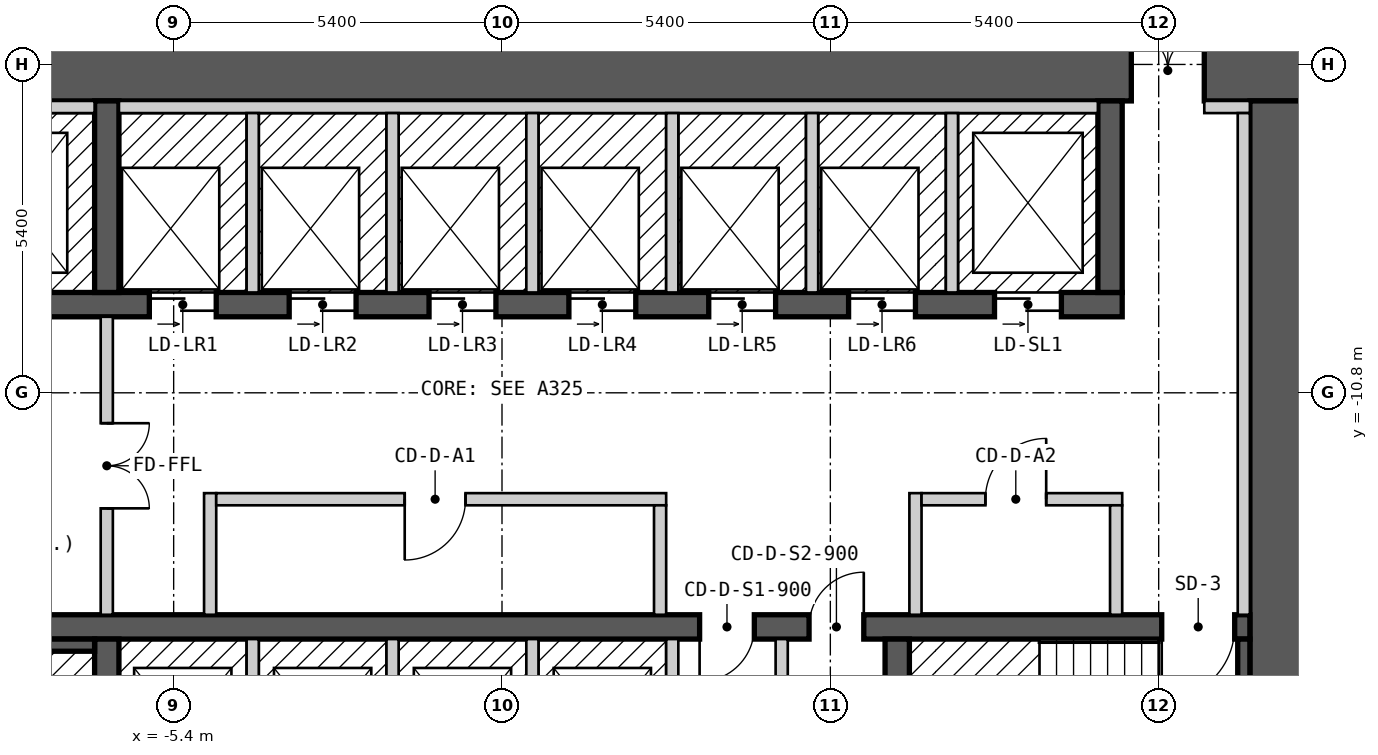
"""IFC4 building model, lengths in metres.
Left out: names, types, materials, properties, quantities, classifications, styles, units other than length and angle.
Written with IfcOpenShell. Run it as: python <this file> out.ifc"""

import sys

from ifc_helpers import new_model, si_unit, direction, frame, frame_2d, origin, place, context, subcontext, project, spatial, rectangle, extrude, element, fill, save


model = new_model("IFC4")
c1 = context("Model", 3, precision=1e-05, world=origin(), true_north=direction((0.0, 1.0)))
c2 = subcontext(c1, "Body", "Model", "MODEL_VIEW")
j1 = project(units=[si_unit("LENGTHUNIT", "METRE"), si_unit("PLANEANGLEUNIT", "RADIAN")], contexts=[c1])
p1 = place(None, origin())
s1 = spatial("IfcSite", under=j1, at=p1, CompositionType="ELEMENT")
p2 = place(p1, origin())
s2 = spatial("IfcBuilding", under=s1, at=p2, CompositionType="ELEMENT")
p3 = place(p2, frame((0.0, 0.0, 84.0)))
s3 = spatial("IfcBuildingStorey", under=s2, at=p3, CompositionType="ELEMENT", Elevation=84.0)
p4 = place(p3, frame((-13.3, -5.5, 0.0), z_axis=(0.0, 0.0, 1.0), x_axis=(1.0, 0.0, 0.0)))
e1 = element("IfcWall", 1, at=p4, inside=s3, PredefinedType="SHEAR", context=c2, shape_type="SweptSolid", body=[
    extrude(rectangle(XDim=26.6, YDim=1.0, at=frame_2d((13.3, 0.0))), origin(), (0.0, 0.0, 1.0), 2.7),
])
p5 = place(p4, frame((23.65, 0.0, 0.0)))
e2 = element("IfcOpeningElement", 2, at=p5, cuts=e1, PredefinedType="OPENING", context=c2, shape_type="SweptSolid", body=[
    extrude(rectangle(XDim=1.2, YDim=2.1, at=frame_2d((0.6, 1.05))), frame((0.0, 0.51, 0.0), z_axis=(0.0, -1.0, 0.0), x_axis=(1.0, 0.0, 0.0)), (0.0, 0.0, 1.0), 1.02),
])
p6 = place(p3, frame((12.8, -18.0, 0.0), z_axis=(0.0, 0.0, 1.0), x_axis=(0.0, 1.0, 0.0)))
e3 = element("IfcWall", 3, at=p6, inside=s3, PredefinedType="SHEAR", context=c2, shape_type="SweptSolid", body=[
    extrude(rectangle(XDim=12.0, YDim=1.0, at=frame_2d((6.0, 0.0))), origin(), (0.0, 0.0, 1.0), 2.7),
])
p7 = place(p3, frame((-12.3, -14.65, 0.0), z_axis=(0.0, 0.0, 1.0), x_axis=(1.0, 0.0, 0.0)))
e4 = element("IfcWall", 4, at=p7, inside=s3, PredefinedType="SHEAR", context=c2, shape_type="SweptSolid", body=[
    extrude(rectangle(XDim=24.6, YDim=0.4, at=frame_2d((12.3, 0.0))), origin(), (0.0, 0.0, 1.0), 2.7),
])
p8 = place(p7, frame((1.5, 0.0, 0.0), z_axis=(0.0, 0.0, 1.0), x_axis=(-1.0, 0.0, 0.0)))
e5 = element("IfcOpeningElement", 5, at=p8, cuts=e4, PredefinedType="OPENING", context=c2, shape_type="SweptSolid", body=[
    extrude(rectangle(XDim=1.2, YDim=2.1, at=frame_2d((0.6, 1.05))), frame((0.0, 0.21, 0.0), z_axis=(0.0, -1.0, 0.0), x_axis=(1.0, 0.0, 0.0)), (0.0, 0.0, 1.0), 0.42),
])
p9 = place(p7, frame((24.35, 0.0, 0.0), z_axis=(0.0, 0.0, 1.0), x_axis=(-1.0, 0.0, 0.0)))
e6 = element("IfcOpeningElement", 6, at=p9, cuts=e4, PredefinedType="OPENING", context=c2, shape_type="SweptSolid", body=[
    extrude(rectangle(XDim=1.2, YDim=2.1, at=frame_2d((0.6, 1.05))), frame((0.0, 0.21, 0.0), z_axis=(0.0, -1.0, 0.0), x_axis=(1.0, 0.0, 0.0)), (0.0, 0.0, 1.0), 0.42),
])
p10 = place(p7, frame((16.45, 0.0, 0.0), z_axis=(0.0, 0.0, 1.0), x_axis=(-1.0, 0.0, 0.0)))
e7 = element("IfcOpeningElement", 7, at=p10, cuts=e4, PredefinedType="OPENING", context=c2, shape_type="SweptSolid", body=[
    extrude(rectangle(XDim=0.9, YDim=2.1, at=frame_2d((0.45, 1.05))), frame((0.0, 0.21, 0.0), z_axis=(0.0, -1.0, 0.0), x_axis=(1.0, 0.0, 0.0)), (0.0, 0.0, 1.0), 0.42),
])
p11 = place(p7, frame((18.25, 0.0, 0.0), z_axis=(0.0, 0.0, 1.0), x_axis=(-1.0, 0.0, 0.0)))
e8 = element("IfcOpeningElement", 8, at=p11, cuts=e4, PredefinedType="OPENING", context=c2, shape_type="SweptSolid", body=[
    extrude(rectangle(XDim=0.9, YDim=2.1, at=frame_2d((0.45, 1.05))), frame((0.0, 0.21, 0.0), z_axis=(0.0, -1.0, 0.0), x_axis=(1.0, 0.0, 0.0)), (0.0, 0.0, 1.0), 0.42),
])
p12 = place(p3, frame((-12.3, -9.35, 0.0), z_axis=(0.0, 0.0, 1.0), x_axis=(1.0, 0.0, 0.0)))
e9 = element("IfcWall", 9, at=p12, inside=s3, PredefinedType="SHEAR", context=c2, shape_type="SweptSolid", body=[
    extrude(rectangle(XDim=22.5, YDim=0.4, at=frame_2d((11.25, 0.0))), origin(), (0.0, 0.0, 1.0), 2.7),
])
p13 = place(p12, frame((0.9, 0.0, 0.0)))
e10 = element("IfcOpeningElement", 10, at=p13, cuts=e9, PredefinedType="OPENING", context=c2, shape_type="SweptSolid", body=[
    extrude(rectangle(XDim=1.1, YDim=2.1, at=frame_2d((0.55, 1.05))), frame((0.0, 0.21, 0.0), z_axis=(0.0, -1.0, 0.0), x_axis=(1.0, 0.0, 0.0)), (0.0, 0.0, 1.0), 0.42),
])
p14 = place(p12, frame((3.7, 0.0, 0.0)))
e11 = element("IfcOpeningElement", 11, at=p14, cuts=e9, PredefinedType="OPENING", context=c2, shape_type="SweptSolid", body=[
    extrude(rectangle(XDim=1.1, YDim=2.1, at=frame_2d((0.55, 1.05))), frame((0.0, 0.21, 0.0), z_axis=(0.0, -1.0, 0.0), x_axis=(1.0, 0.0, 0.0)), (0.0, 0.0, 1.0), 0.42),
])
p15 = place(p12, frame((6.5, 0.0, 0.0)))
e12 = element("IfcOpeningElement", 12, at=p15, cuts=e9, PredefinedType="OPENING", context=c2, shape_type="SweptSolid", body=[
    extrude(rectangle(XDim=1.1, YDim=2.1, at=frame_2d((0.55, 1.05))), frame((0.0, 0.21, 0.0), z_axis=(0.0, -1.0, 0.0), x_axis=(1.0, 0.0, 0.0)), (0.0, 0.0, 1.0), 0.42),
])
p16 = place(p12, frame((8.8, 0.0, 0.0)))
e13 = element("IfcOpeningElement", 13, at=p16, cuts=e9, PredefinedType="OPENING", context=c2, shape_type="SweptSolid", body=[
    extrude(rectangle(XDim=1.1, YDim=2.1, at=frame_2d((0.55, 1.05))), frame((0.0, 0.21, 0.0), z_axis=(0.0, -1.0, 0.0), x_axis=(1.0, 0.0, 0.0)), (0.0, 0.0, 1.0), 0.42),
])
p17 = place(p12, frame((11.1, 0.0, 0.0)))
e14 = element("IfcOpeningElement", 14, at=p17, cuts=e9, PredefinedType="OPENING", context=c2, shape_type="SweptSolid", body=[
    extrude(rectangle(XDim=1.1, YDim=2.1, at=frame_2d((0.55, 1.05))), frame((0.0, 0.21, 0.0), z_axis=(0.0, -1.0, 0.0), x_axis=(1.0, 0.0, 0.0)), (0.0, 0.0, 1.0), 0.42),
])
p18 = place(p12, frame((13.4, 0.0, 0.0)))
e15 = element("IfcOpeningElement", 15, at=p18, cuts=e9, PredefinedType="OPENING", context=c2, shape_type="SweptSolid", body=[
    extrude(rectangle(XDim=1.1, YDim=2.1, at=frame_2d((0.55, 1.05))), frame((0.0, 0.21, 0.0), z_axis=(0.0, -1.0, 0.0), x_axis=(1.0, 0.0, 0.0)), (0.0, 0.0, 1.0), 0.42),
])
p19 = place(p12, frame((15.7, 0.0, 0.0)))
e16 = element("IfcOpeningElement", 16, at=p19, cuts=e9, PredefinedType="OPENING", context=c2, shape_type="SweptSolid", body=[
    extrude(rectangle(XDim=1.1, YDim=2.1, at=frame_2d((0.55, 1.05))), frame((0.0, 0.21, 0.0), z_axis=(0.0, -1.0, 0.0), x_axis=(1.0, 0.0, 0.0)), (0.0, 0.0, 1.0), 0.42),
])
p20 = place(p12, frame((18.0, 0.0, 0.0)))
e17 = element("IfcOpeningElement", 17, at=p20, cuts=e9, PredefinedType="OPENING", context=c2, shape_type="SweptSolid", body=[
    extrude(rectangle(XDim=1.1, YDim=2.1, at=frame_2d((0.55, 1.05))), frame((0.0, 0.21, 0.0), z_axis=(0.0, -1.0, 0.0), x_axis=(1.0, 0.0, 0.0)), (0.0, 0.0, 1.0), 0.42),
])
p21 = place(p12, frame((20.4, 0.0, 0.0)))
e18 = element("IfcOpeningElement", 18, at=p21, cuts=e9, PredefinedType="OPENING", context=c2, shape_type="SweptSolid", body=[
    extrude(rectangle(XDim=1.1, YDim=2.1, at=frame_2d((0.55, 1.05))), frame((0.0, 0.21, 0.0), z_axis=(0.0, -1.0, 0.0), x_axis=(1.0, 0.0, 0.0)), (0.0, 0.0, 1.0), 0.42),
])
for number, where, z_axis, x_axis in (
    (19, (-6.5, -18.0, 0.0), (0.0, 0.0, 1.0), (0.0, 1.0, 0.0)),
    (20, (6.5, -18.0, 0.0), (0.0, 0.0, 1.0), (0.0, 1.0, 0.0)),
    (21, (-6.5, -9.15, 0.0), (0.0, 0.0, 1.0), (0.0, 1.0, 0.0)),
    (22, (10.0, -9.15, 0.0), (0.0, 0.0, 1.0), (0.0, 1.0, 0.0)),
):
    element("IfcWall", number, at=place(p3, frame(where, z_axis=z_axis, x_axis=x_axis)), inside=s3, PredefinedType="SHEAR", context=c2, shape_type="SweptSolid", body=[
        extrude(rectangle(XDim=3.15, YDim=0.4, at=frame_2d((1.575, 0.0))), origin(), (0.0, 0.0, 1.0), 2.7),
    ])
p22 = place(p3, frame((-12.1, -6.1, 0.0), z_axis=(0.0, 0.0, 1.0), x_axis=(1.0, 0.0, 0.0)))
e23 = element("IfcWall", 23, at=p22, inside=s3, PredefinedType="SOLIDWALL", context=c2, shape_type="SweptSolid", body=[
    extrude(rectangle(XDim=5.4, YDim=0.2, at=frame_2d((2.7, 0.0))), origin(), (0.0, 0.0, 1.0), 2.7),
])
p23 = place(p3, frame((-10.8, -14.95, 0.0), z_axis=(0.0, 0.0, 1.0), x_axis=(1.0, 0.0, 0.0)))
e24 = element("IfcWall", 24, at=p23, inside=s3, PredefinedType="SOLIDWALL", context=c2, shape_type="SweptSolid", body=[
    extrude(rectangle(XDim=4.1, YDim=0.2, at=frame_2d((2.05, 0.0))), origin(), (0.0, 0.0, 1.0), 2.7),
])
p24 = place(p3, frame((-6.5, -14.45, 0.0), z_axis=(0.0, 0.0, 1.0), x_axis=(0.0, 1.0, 0.0)))
e25 = element("IfcWall", 25, at=p24, inside=s3, PredefinedType="PARTITIONING", context=c2, shape_type="SweptSolid", body=[
    extrude(rectangle(XDim=4.9, YDim=0.2, at=frame_2d((2.45, 0.0))), origin(), (0.0, 0.0, 1.0), 2.7),
])
p25 = place(p24, frame((3.15, 0.0, 0.0), z_axis=(0.0, 0.0, 1.0), x_axis=(-1.0, 0.0, 0.0)))
e26 = element("IfcOpeningElement", 26, at=p25, cuts=e25, PredefinedType="OPENING", context=c2, shape_type="SweptSolid", body=[
    extrude(rectangle(XDim=1.4, YDim=2.1, at=frame_2d((0.7, 1.05))), frame((0.0, 0.11, 0.0), z_axis=(0.0, -1.0, 0.0), x_axis=(1.0, 0.0, 0.0)), (0.0, 0.0, 1.0), 0.22),
])
p26 = place(p3, frame((-6.3, -6.1, 0.0), z_axis=(0.0, 0.0, 1.0), x_axis=(1.0, 0.0, 0.0)))
e27 = element("IfcWall", 27, at=p26, inside=s3, PredefinedType="SOLIDWALL", context=c2, shape_type="SweptSolid", body=[
    extrude(rectangle(XDim=16.1, YDim=0.2, at=frame_2d((8.05, 0.0))), origin(), (0.0, 0.0, 1.0), 2.7),
])
p27 = place(p3, frame((-4.8, -14.45, 0.0), z_axis=(0.0, 0.0, 1.0), x_axis=(0.0, 1.0, 0.0)))
e28 = element("IfcWall", 28, at=p27, inside=s3, PredefinedType="PARTITIONING", context=c2, shape_type="SweptSolid", body=[
    extrude(rectangle(XDim=2.0, YDim=0.2, at=frame_2d((1.0, 0.0))), origin(), (0.0, 0.0, 1.0), 2.7),
])
p28 = place(p3, frame((-4.7, -12.55, 0.0), z_axis=(0.0, 0.0, 1.0), x_axis=(1.0, 0.0, 0.0)))
e29 = element("IfcWall", 29, at=p28, inside=s3, PredefinedType="PARTITIONING", context=c2, shape_type="SweptSolid", body=[
    extrude(rectangle(XDim=7.4, YDim=0.2, at=frame_2d((3.7, 0.0))), origin(), (0.0, 0.0, 1.0), 2.7),
])
p29 = place(p28, frame((4.1, 0.0, 0.0), z_axis=(0.0, 0.0, 1.0), x_axis=(-1.0, 0.0, 0.0)))
e30 = element("IfcOpeningElement", 30, at=p29, cuts=e29, PredefinedType="OPENING", context=c2, shape_type="SweptSolid", body=[
    extrude(rectangle(XDim=1.0, YDim=2.1, at=frame_2d((0.5, 1.05))), frame((0.0, 0.11, 0.0), z_axis=(0.0, -1.0, 0.0), x_axis=(1.0, 0.0, 0.0)), (0.0, 0.0, 1.0), 0.22),
])
for number, where, z_axis, x_axis in (
    (31, (-4.1, -17.8, 0.0), (0.0, 0.0, 1.0), (0.0, 1.0, 0.0)),
    (32, (-4.1, -9.15, 0.0), (0.0, 0.0, 1.0), (0.0, 1.0, 0.0)),
    (33, (-1.8, -17.8, 0.0), (0.0, 0.0, 1.0), (0.0, 1.0, 0.0)),
    (34, (-1.8, -9.15, 0.0), (0.0, 0.0, 1.0), (0.0, 1.0, 0.0)),
    (35, (0.5, -17.8, 0.0), (0.0, 0.0, 1.0), (0.0, 1.0, 0.0)),
    (36, (0.5, -9.15, 0.0), (0.0, 0.0, 1.0), (0.0, 1.0, 0.0)),
):
    element("IfcWall", number, at=place(p3, frame(where, z_axis=z_axis, x_axis=x_axis)), inside=s3, PredefinedType="SOLIDWALL", context=c2, shape_type="SweptSolid", body=[
        extrude(rectangle(XDim=2.95, YDim=0.2, at=frame_2d((1.475, 0.0))), origin(), (0.0, 0.0, 1.0), 2.7),
    ])
p30 = place(p3, frame((2.6, -14.45, 0.0), z_axis=(0.0, 0.0, 1.0), x_axis=(0.0, 1.0, 0.0)))
e37 = element("IfcWall", 37, at=p30, inside=s3, PredefinedType="PARTITIONING", context=c2, shape_type="SweptSolid", body=[
    extrude(rectangle(XDim=1.8, YDim=0.2, at=frame_2d((0.9, 0.0))), origin(), (0.0, 0.0, 1.0), 2.7),
])
for number, where, z_axis, x_axis in (
    (38, (2.8, -17.8, 0.0), (0.0, 0.0, 1.0), (0.0, 1.0, 0.0)),
    (39, (2.8, -9.15, 0.0), (0.0, 0.0, 1.0), (0.0, 1.0, 0.0)),
):
    element("IfcWall", number, at=place(p3, frame(where, z_axis=z_axis, x_axis=x_axis)), inside=s3, PredefinedType="SOLIDWALL", context=c2, shape_type="SweptSolid", body=[
        extrude(rectangle(XDim=2.95, YDim=0.2, at=frame_2d((1.475, 0.0))), origin(), (0.0, 0.0, 1.0), 2.7),
    ])
p31 = place(p3, frame((4.6, -17.8, 0.0), z_axis=(0.0, 0.0, 1.0), x_axis=(0.0, 1.0, 0.0)))
e40 = element("IfcWall", 40, at=p31, inside=s3, PredefinedType="PARTITIONING", context=c2, shape_type="SweptSolid", body=[
    extrude(rectangle(XDim=2.95, YDim=0.2, at=frame_2d((1.475, 0.0))), origin(), (0.0, 0.0, 1.0), 2.7),
])
p32 = place(p3, frame((5.1, -9.15, 0.0), z_axis=(0.0, 0.0, 1.0), x_axis=(0.0, 1.0, 0.0)))
e41 = element("IfcWall", 41, at=p32, inside=s3, PredefinedType="SOLIDWALL", context=c2, shape_type="SweptSolid", body=[
    extrude(rectangle(XDim=2.95, YDim=0.2, at=frame_2d((1.475, 0.0))), origin(), (0.0, 0.0, 1.0), 2.7),
])
p33 = place(p3, frame((6.8, -14.45, 0.0), z_axis=(0.0, 0.0, 1.0), x_axis=(0.0, 1.0, 0.0)))
e42 = element("IfcWall", 42, at=p33, inside=s3, PredefinedType="PARTITIONING", context=c2, shape_type="SweptSolid", body=[
    extrude(rectangle(XDim=2.0, YDim=0.2, at=frame_2d((1.0, 0.0))), origin(), (0.0, 0.0, 1.0), 2.7),
])
p34 = place(p3, frame((6.9, -12.55, 0.0), z_axis=(0.0, 0.0, 1.0), x_axis=(1.0, 0.0, 0.0)))
e43 = element("IfcWall", 43, at=p34, inside=s3, PredefinedType="PARTITIONING", context=c2, shape_type="SweptSolid", body=[
    extrude(rectangle(XDim=3.3, YDim=0.2, at=frame_2d((1.65, 0.0))), origin(), (0.0, 0.0, 1.0), 2.7),
])
p35 = place(p34, frame((2.05, 0.0, 0.0), z_axis=(0.0, 0.0, 1.0), x_axis=(-1.0, 0.0, 0.0)))
e44 = element("IfcOpeningElement", 44, at=p35, cuts=e43, PredefinedType="OPENING", context=c2, shape_type="SweptSolid", body=[
    extrude(rectangle(XDim=1.0, YDim=2.1, at=frame_2d((0.5, 1.05))), frame((0.0, 0.11, 0.0), z_axis=(0.0, -1.0, 0.0), x_axis=(1.0, 0.0, 0.0)), (0.0, 0.0, 1.0), 0.22),
])
p36 = place(p3, frame((7.4, -9.15, 0.0), z_axis=(0.0, 0.0, 1.0), x_axis=(0.0, 1.0, 0.0)))
e45 = element("IfcWall", 45, at=p36, inside=s3, PredefinedType="SOLIDWALL", context=c2, shape_type="SweptSolid", body=[
    extrude(rectangle(XDim=2.95, YDim=0.2, at=frame_2d((1.475, 0.0))), origin(), (0.0, 0.0, 1.0), 2.7),
])
p37 = place(p3, frame((10.1, -14.45, 0.0), z_axis=(0.0, 0.0, 1.0), x_axis=(0.0, 1.0, 0.0)))
e46 = element("IfcWall", 46, at=p37, inside=s3, PredefinedType="PARTITIONING", context=c2, shape_type="SweptSolid", body=[
    extrude(rectangle(XDim=1.8, YDim=0.2, at=frame_2d((0.9, 0.0))), origin(), (0.0, 0.0, 1.0), 2.7),
])
p38 = place(p3, frame((11.55, -6.1, 0.0), z_axis=(0.0, 0.0, 1.0), x_axis=(1.0, 0.0, 0.0)))
e47 = element("IfcWall", 47, at=p38, inside=s3, PredefinedType="PARTITIONING", context=c2, shape_type="SweptSolid", body=[
    extrude(rectangle(XDim=0.75, YDim=0.2, at=frame_2d((0.375, 0.0))), origin(), (0.0, 0.0, 1.0), 2.7),
])
p39 = place(p3, frame((12.2, -17.6, 0.0), z_axis=(0.0, 0.0, 1.0), x_axis=(0.0, 1.0, 0.0)))
e48 = element("IfcWall", 48, at=p39, inside=s3, PredefinedType="SOLIDWALL", context=c2, shape_type="SweptSolid", body=[
    extrude(rectangle(XDim=2.75, YDim=0.2, at=frame_2d((1.375, 0.0))), origin(), (0.0, 0.0, 1.0), 2.7),
])
p40 = place(p3, frame((12.2, -14.45, 0.0), z_axis=(0.0, 0.0, 1.0), x_axis=(0.0, 1.0, 0.0)))
e49 = element("IfcWall", 49, at=p40, inside=s3, PredefinedType="PARTITIONING", context=c2, shape_type="SweptSolid", body=[
    extrude(rectangle(XDim=8.25, YDim=0.2, at=frame_2d((4.125, 0.0))), origin(), (0.0, 0.0, 1.0), 2.7),
])
p41 = place(p15, origin())
e50 = element("IfcDoor", 50, at=p41, inside=s3, OperationType="DOUBLE_DOOR_SLIDING", PredefinedType="DOOR", context=c2, shape_type="SweptSolid", body=[
    extrude(rectangle(XDim=1.1, YDim=2.1, at=frame_2d((0.55, 1.05))), frame((0.0, 0.025, 0.0), z_axis=(0.0, -1.0, 0.0), x_axis=(1.0, 0.0, 0.0)), (0.0, 0.0, 1.0), 0.05),
])
fill(e12, e50)
p42 = place(p16, origin())
e51 = element("IfcDoor", 51, at=p42, inside=s3, OperationType="DOUBLE_DOOR_SLIDING", PredefinedType="DOOR", context=c2, shape_type="SweptSolid", body=[
    extrude(rectangle(XDim=1.1, YDim=2.1, at=frame_2d((0.55, 1.05))), frame((0.0, 0.025, 0.0), z_axis=(0.0, -1.0, 0.0), x_axis=(1.0, 0.0, 0.0)), (0.0, 0.0, 1.0), 0.05),
])
fill(e13, e51)
p43 = place(p17, origin())
e52 = element("IfcDoor", 52, at=p43, inside=s3, OperationType="DOUBLE_DOOR_SLIDING", PredefinedType="DOOR", context=c2, shape_type="SweptSolid", body=[
    extrude(rectangle(XDim=1.1, YDim=2.1, at=frame_2d((0.55, 1.05))), frame((0.0, 0.025, 0.0), z_axis=(0.0, -1.0, 0.0), x_axis=(1.0, 0.0, 0.0)), (0.0, 0.0, 1.0), 0.05),
])
fill(e14, e52)
p44 = place(p18, origin())
e53 = element("IfcDoor", 53, at=p44, inside=s3, OperationType="DOUBLE_DOOR_SLIDING", PredefinedType="DOOR", context=c2, shape_type="SweptSolid", body=[
    extrude(rectangle(XDim=1.1, YDim=2.1, at=frame_2d((0.55, 1.05))), frame((0.0, 0.025, 0.0), z_axis=(0.0, -1.0, 0.0), x_axis=(1.0, 0.0, 0.0)), (0.0, 0.0, 1.0), 0.05),
])
fill(e15, e53)
p45 = place(p19, origin())
e54 = element("IfcDoor", 54, at=p45, inside=s3, OperationType="DOUBLE_DOOR_SLIDING", PredefinedType="DOOR", context=c2, shape_type="SweptSolid", body=[
    extrude(rectangle(XDim=1.1, YDim=2.1, at=frame_2d((0.55, 1.05))), frame((0.0, 0.025, 0.0), z_axis=(0.0, -1.0, 0.0), x_axis=(1.0, 0.0, 0.0)), (0.0, 0.0, 1.0), 0.05),
])
fill(e16, e54)
p46 = place(p20, origin())
e55 = element("IfcDoor", 55, at=p46, inside=s3, OperationType="DOUBLE_DOOR_SLIDING", PredefinedType="DOOR", context=c2, shape_type="SweptSolid", body=[
    extrude(rectangle(XDim=1.1, YDim=2.1, at=frame_2d((0.55, 1.05))), frame((0.0, 0.025, 0.0), z_axis=(0.0, -1.0, 0.0), x_axis=(1.0, 0.0, 0.0)), (0.0, 0.0, 1.0), 0.05),
])
fill(e17, e55)
p47 = place(p21, origin())
e56 = element("IfcDoor", 56, at=p47, inside=s3, OperationType="DOUBLE_DOOR_SLIDING", PredefinedType="DOOR", context=c2, shape_type="SweptSolid", body=[
    extrude(rectangle(XDim=1.1, YDim=2.1, at=frame_2d((0.55, 1.05))), frame((0.0, 0.025, 0.0), z_axis=(0.0, -1.0, 0.0), x_axis=(1.0, 0.0, 0.0)), (0.0, 0.0, 1.0), 0.05),
])
fill(e18, e56)
p48 = place(p9, origin())
e57 = element("IfcDoor", 57, at=p48, inside=s3, OperationType="SINGLE_SWING_RIGHT", PredefinedType="DOOR", context=c2, shape_type="SweptSolid", body=[
    extrude(rectangle(XDim=1.2, YDim=2.1, at=frame_2d((0.6, 1.05))), frame((0.0, 0.025, 0.0), z_axis=(0.0, -1.0, 0.0), x_axis=(1.0, 0.0, 0.0)), (0.0, 0.0, 1.0), 0.05),
])
fill(e6, e57)
p49 = place(p25, origin())
e58 = element("IfcDoor", 58, at=p49, inside=s3, OperationType="DOUBLE_DOOR_SINGLE_SWING", PredefinedType="DOOR", context=c2, shape_type="SweptSolid", body=[
    extrude(rectangle(XDim=1.4, YDim=2.1, at=frame_2d((0.7, 1.05))), frame((0.0, 0.025, 0.0), z_axis=(0.0, -1.0, 0.0), x_axis=(1.0, 0.0, 0.0)), (0.0, 0.0, 1.0), 0.05),
])
fill(e26, e58)
p50 = place(p5, origin())
e59 = element("IfcDoor", 59, at=p50, inside=s3, OperationType="DOUBLE_DOOR_SINGLE_SWING", PredefinedType="DOOR", context=c2, shape_type="SweptSolid", body=[
    extrude(rectangle(XDim=1.2, YDim=2.1, at=frame_2d((0.6, 1.05))), frame((0.0, 0.025, 0.0), z_axis=(0.0, -1.0, 0.0), x_axis=(1.0, 0.0, 0.0)), (0.0, 0.0, 1.0), 0.05),
])
fill(e2, e59)
p51 = place(p29, origin())
e60 = element("IfcDoor", 60, at=p51, inside=s3, OperationType="SINGLE_SWING_RIGHT", PredefinedType="DOOR", context=c2, shape_type="SweptSolid", body=[
    extrude(rectangle(XDim=1.0, YDim=2.1, at=frame_2d((0.5, 1.05))), frame((0.0, 0.025, 0.0), z_axis=(0.0, -1.0, 0.0), x_axis=(1.0, 0.0, 0.0)), (0.0, 0.0, 1.0), 0.05),
])
fill(e30, e60)
p52 = place(p35, origin())
e61 = element("IfcDoor", 61, at=p52, inside=s3, OperationType="SINGLE_SWING_LEFT", PredefinedType="DOOR", context=c2, shape_type="SweptSolid", body=[
    extrude(rectangle(XDim=1.0, YDim=2.1, at=frame_2d((0.5, 1.05))), frame((0.0, 0.025, 0.0), z_axis=(0.0, -1.0, 0.0), x_axis=(1.0, 0.0, 0.0)), (0.0, 0.0, 1.0), 0.05),
])
fill(e44, e61)
p53 = place(p10, origin())
e62 = element("IfcDoor", 62, at=p53, inside=s3, OperationType="SINGLE_SWING_RIGHT", PredefinedType="DOOR", context=c2, shape_type="SweptSolid", body=[
    extrude(rectangle(XDim=0.9, YDim=2.1, at=frame_2d((0.45, 1.05))), frame((0.0, 0.025, 0.0), z_axis=(0.0, -1.0, 0.0), x_axis=(1.0, 0.0, 0.0)), (0.0, 0.0, 1.0), 0.05),
])
fill(e7, e62)
p54 = place(p11, origin())
e63 = element("IfcDoor", 63, at=p54, inside=s3, OperationType="SINGLE_SWING_LEFT", PredefinedType="DOOR", context=c2, shape_type="SweptSolid", body=[
    extrude(rectangle(XDim=0.9, YDim=2.1, at=frame_2d((0.45, 1.05))), frame((0.0, 0.025, 0.0), z_axis=(0.0, -1.0, 0.0), x_axis=(1.0, 0.0, 0.0)), (0.0, 0.0, 1.0), 0.05),
])
fill(e8, e63)
save(model, sys.argv[1])
